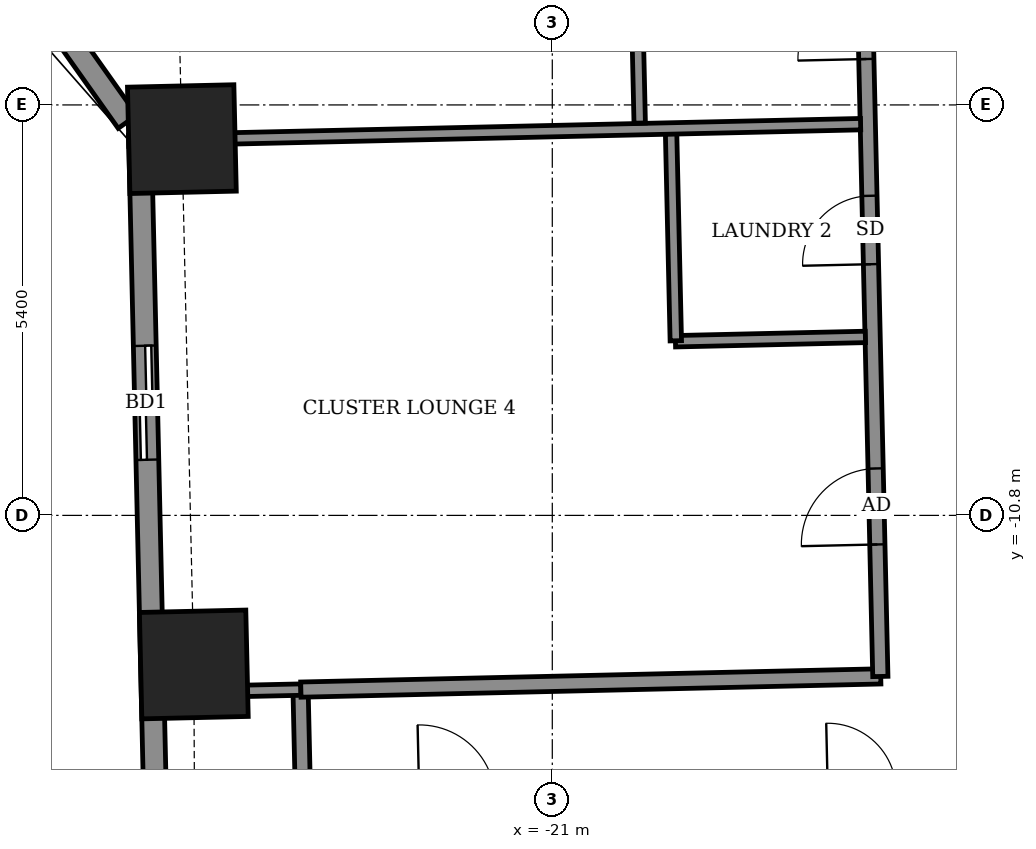
"""IFC4 building model, lengths in metres.
Left out: names, types, materials, properties, quantities, classifications, styles, units other than length and angle.
Written with IfcOpenShell. Run it as: python <this file> out.ifc"""

import sys

from ifc_helpers import new_model, si_unit, direction, frame, frame_2d, origin, origin_2d, place, context, subcontext, project, spatial, rectangle, extrude, element, fill, save


model = new_model("IFC4")
c1 = context("Model", 3, precision=1e-05, world=origin(), true_north=direction((0.0, 1.0)))
c2 = subcontext(c1, "Body", "Model", "MODEL_VIEW")
j1 = project(units=[si_unit("LENGTHUNIT", "METRE"), si_unit("PLANEANGLEUNIT", "RADIAN")], contexts=[c1])
p1 = place(None, origin())
s1 = spatial("IfcSite", under=j1, at=p1, CompositionType="ELEMENT")
p2 = place(p1, origin())
s2 = spatial("IfcBuilding", under=s1, at=p2, CompositionType="ELEMENT")
p3 = place(p2, frame((0.0, 0.0, 90.1)))
s3 = spatial("IfcBuildingStorey", under=s2, at=p3, CompositionType="ELEMENT", Elevation=90.1)
for number, where, z_axis, x_axis in (
    (1, (-25.873, -5.85, -0.55), (0.0, 0.0, 1.0), (0.023, -1.0, 0.0)),
    (2, (-25.716, -12.761, -0.55), (0.0, 0.0, 1.0), (0.023, -1.0, 0.0)),
):
    element("IfcColumn", number, at=place(p3, frame(where, z_axis=z_axis, x_axis=x_axis)), inside=s3, PredefinedType="COLUMN", context=c2, shape_type="SweptSolid", body=[
        extrude(rectangle(XDim=1.4, YDim=1.4, at=origin_2d()), origin(), (0.0, 0.0, 1.0), 3.6),
    ])
p4 = place(p3, frame((-28.651, -2.71, 0.0), z_axis=(0.0, 0.0, 1.0), x_axis=(0.577964171051, -0.816062140392, 0.0)))
e3 = element("IfcWall", 3, at=p4, inside=s3, PredefinedType="SOLIDWALL", context=c2, shape_type="SweptSolid", body=[
    extrude(rectangle(XDim=3.567, YDim=0.3, at=frame_2d((1.784, 0.0))), origin(), (0.0, 0.0, 1.0), 3.05),
])
p5 = place(p4, frame((0.337, 0.0, 0.9)))
e4 = element("IfcOpeningElement", 4, at=p5, cuts=e3, PredefinedType="OPENING", context=c2, shape_type="SweptSolid", body=[
    extrude(rectangle(XDim=1.2, YDim=1.5, at=frame_2d((0.6, 0.75))), frame((0.0, 0.16, 0.0), z_axis=(0.0, -1.0, 0.0), x_axis=(1.0, 0.0, 0.0)), (0.0, 0.0, 1.0), 0.32),
])
p6 = place(p3, frame((-26.424, -5.808, 0.0), z_axis=(0.0, 0.0, 1.0), x_axis=(0.022654755793, -0.999743348085, 0.0)))
e5 = element("IfcWall", 5, at=p6, inside=s3, PredefinedType="SOLIDWALL", context=c2, shape_type="SweptSolid", body=[
    extrude(rectangle(XDim=13.729, YDim=0.3, at=frame_2d((6.865, 0.0))), origin(), (0.0, 0.0, 1.0), 3.05),
])
p7 = place(p6, frame((2.761, 0.0, 0.0)))
e6 = element("IfcOpeningElement", 6, at=p7, cuts=e5, PredefinedType="OPENING", context=c2, shape_type="SweptSolid", body=[
    extrude(rectangle(XDim=1.5, YDim=2.4, at=frame_2d((0.75, 1.2))), frame((0.0, 0.16, 0.0), z_axis=(0.0, -1.0, 0.0), x_axis=(1.0, 0.0, 0.0)), (0.0, 0.0, 1.0), 0.32),
])
p8 = place(p6, frame((8.894, 0.0, 0.9)))
e7 = element("IfcOpeningElement", 7, at=p8, cuts=e5, PredefinedType="OPENING", context=c2, shape_type="SweptSolid", body=[
    extrude(rectangle(XDim=2.4, YDim=1.5, at=frame_2d((1.2, 0.75))), frame((0.0, 0.16, 0.0), z_axis=(0.0, -1.0, 0.0), x_axis=(1.0, 0.0, 0.0)), (0.0, 0.0, 1.0), 0.32),
])
p9 = place(p3, frame((-24.278, -14.591, 0.0), z_axis=(0.0, 0.0, 1.0), x_axis=(-0.022632637625, 0.99974384905, 0.0)))
e8 = element("IfcWall", 8, at=p9, inside=s3, PredefinedType="PARTITIONING", context=c2, shape_type="SweptSolid", body=[
    extrude(rectangle(XDim=1.5, YDim=0.2, at=frame_2d((0.75, 0.0))), origin(), (0.0, 0.0, 1.0), 3.05),
])
p10 = place(p3, frame((-24.274, -14.591, 0.0), z_axis=(0.0, 0.0, 1.0), x_axis=(0.999742718753, 0.022682510909, 0.0)))
e9 = element("IfcWall", 9, at=p10, inside=s3, PredefinedType="PARTITIONING", context=c2, shape_type="SweptSolid", body=[
    extrude(rectangle(XDim=52.471, YDim=0.2, at=frame_2d((26.236, 0.0))), origin(), (0.0, 0.0, 1.0), 3.05),
])
p11 = place(p10, frame((1.525, 0.0, 0.0)))
e10 = element("IfcOpeningElement", 10, at=p11, cuts=e9, PredefinedType="OPENING", context=c2, shape_type="SweptSolid", body=[
    extrude(rectangle(XDim=1.0, YDim=2.1, at=frame_2d((0.5, 1.05))), frame((0.0, 0.11, 0.0), z_axis=(0.0, -1.0, 0.0), x_axis=(1.0, 0.0, 0.0)), (0.0, 0.0, 1.0), 0.22),
])
p12 = place(p10, frame((6.9, 0.0, 0.0)))
e11 = element("IfcOpeningElement", 11, at=p12, cuts=e9, PredefinedType="OPENING", context=c2, shape_type="SweptSolid", body=[
    extrude(rectangle(XDim=0.9, YDim=2.1, at=frame_2d((0.45, 1.05))), frame((0.0, 0.11, 0.0), z_axis=(0.0, -1.0, 0.0), x_axis=(1.0, 0.0, 0.0)), (0.0, 0.0, 1.0), 0.22),
])
p13 = place(p10, frame((11.575, 0.0, 0.0)))
e12 = element("IfcOpeningElement", 12, at=p13, cuts=e9, PredefinedType="OPENING", context=c2, shape_type="SweptSolid", body=[
    extrude(rectangle(XDim=0.9, YDim=2.1, at=frame_2d((0.45, 1.05))), frame((0.0, 0.11, 0.0), z_axis=(0.0, -1.0, 0.0), x_axis=(1.0, 0.0, 0.0)), (0.0, 0.0, 1.0), 0.22),
])
p14 = place(p10, frame((13.6, 0.0, 0.0)))
e13 = element("IfcOpeningElement", 13, at=p14, cuts=e9, PredefinedType="OPENING", context=c2, shape_type="SweptSolid", body=[
    extrude(rectangle(XDim=0.9, YDim=2.1, at=frame_2d((0.45, 1.05))), frame((0.0, 0.11, 0.0), z_axis=(0.0, -1.0, 0.0), x_axis=(1.0, 0.0, 0.0)), (0.0, 0.0, 1.0), 0.22),
])
p15 = place(p10, frame((20.45, 0.0, 0.0)))
e14 = element("IfcOpeningElement", 14, at=p15, cuts=e9, PredefinedType="OPENING", context=c2, shape_type="SweptSolid", body=[
    extrude(rectangle(XDim=0.9, YDim=2.1, at=frame_2d((0.45, 1.05))), frame((0.0, 0.11, 0.0), z_axis=(0.0, -1.0, 0.0), x_axis=(1.0, 0.0, 0.0)), (0.0, 0.0, 1.0), 0.22),
])
p16 = place(p10, frame((22.6, 0.0, 0.0)))
e15 = element("IfcOpeningElement", 15, at=p16, cuts=e9, PredefinedType="OPENING", context=c2, shape_type="SweptSolid", body=[
    extrude(rectangle(XDim=0.9, YDim=2.1, at=frame_2d((0.45, 1.05))), frame((0.0, 0.11, 0.0), z_axis=(0.0, -1.0, 0.0), x_axis=(1.0, 0.0, 0.0)), (0.0, 0.0, 1.0), 0.22),
])
p17 = place(p10, frame((29.475, 0.0, 0.0)))
e16 = element("IfcOpeningElement", 16, at=p17, cuts=e9, PredefinedType="OPENING", context=c2, shape_type="SweptSolid", body=[
    extrude(rectangle(XDim=0.9, YDim=2.1, at=frame_2d((0.45, 1.05))), frame((0.0, 0.11, 0.0), z_axis=(0.0, -1.0, 0.0), x_axis=(1.0, 0.0, 0.0)), (0.0, 0.0, 1.0), 0.22),
])
p18 = place(p10, frame((31.675, 0.0, 0.0)))
e17 = element("IfcOpeningElement", 17, at=p18, cuts=e9, PredefinedType="OPENING", context=c2, shape_type="SweptSolid", body=[
    extrude(rectangle(XDim=0.9, YDim=2.1, at=frame_2d((0.45, 1.05))), frame((0.0, 0.11, 0.0), z_axis=(0.0, -1.0, 0.0), x_axis=(1.0, 0.0, 0.0)), (0.0, 0.0, 1.0), 0.22),
])
p19 = place(p10, frame((38.675, 0.0, 0.0)))
e18 = element("IfcOpeningElement", 18, at=p19, cuts=e9, PredefinedType="OPENING", context=c2, shape_type="SweptSolid", body=[
    extrude(rectangle(XDim=0.9, YDim=2.1, at=frame_2d((0.45, 1.05))), frame((0.0, 0.11, 0.0), z_axis=(0.0, -1.0, 0.0), x_axis=(1.0, 0.0, 0.0)), (0.0, 0.0, 1.0), 0.22),
])
p20 = place(p10, frame((40.675, 0.0, 0.0)))
e19 = element("IfcOpeningElement", 19, at=p20, cuts=e9, PredefinedType="OPENING", context=c2, shape_type="SweptSolid", body=[
    extrude(rectangle(XDim=0.9, YDim=2.1, at=frame_2d((0.45, 1.05))), frame((0.0, 0.11, 0.0), z_axis=(0.0, -1.0, 0.0), x_axis=(1.0, 0.0, 0.0)), (0.0, 0.0, 1.0), 0.22),
])
p21 = place(p10, frame((50.436, 0.0, 0.0)))
e20 = element("IfcOpeningElement", 20, at=p21, cuts=e9, PredefinedType="OPENING", context=c2, shape_type="SweptSolid", body=[
    extrude(rectangle(XDim=1.0, YDim=2.1, at=frame_2d((0.5, 1.05))), frame((0.0, 0.11, 0.0), z_axis=(0.0, -1.0, 0.0), x_axis=(1.0, 0.0, 0.0)), (0.0, 0.0, 1.0), 0.22),
])
p22 = place(p10, frame((45.45, 0.0, 0.0)))
e21 = element("IfcOpeningElement", 21, at=p22, cuts=e9, PredefinedType="OPENING", context=c2, shape_type="SweptSolid", body=[
    extrude(rectangle(XDim=0.9, YDim=2.1, at=frame_2d((0.45, 1.05))), frame((0.0, 0.11, 0.0), z_axis=(0.0, -1.0, 0.0), x_axis=(1.0, 0.0, 0.0)), (0.0, 0.0, 1.0), 0.22),
])
p23 = place(p3, frame((-26.108, -13.132, 0.0), z_axis=(0.0, 0.0, 1.0), x_axis=(0.999752642043, 0.022240834685, 0.0)))
e22 = element("IfcWall", 22, at=p23, inside=s3, PredefinedType="PARTITIONING", context=c2, shape_type="SweptSolid", body=[
    extrude(rectangle(XDim=1.8, YDim=0.15, at=frame_2d((0.9, 0.0))), origin(), (0.0, 0.0, 1.0), 3.05),
])
p24 = place(p3, frame((-24.308, -13.092, 0.0), z_axis=(0.0, 0.0, 1.0), x_axis=(0.999739800004, 0.022810793222, 0.0)))
e23 = element("IfcWall", 23, at=p24, inside=s3, PredefinedType="PARTITIONING", context=c2, shape_type="SweptSolid", body=[
    extrude(rectangle(XDim=7.631, YDim=0.2, at=frame_2d((3.815, 0.0))), origin(), (0.0, 0.0, 1.0), 3.05),
])
p25 = place(p3, frame((-16.684, -12.919, 0.0), z_axis=(0.0, 0.0, 1.0), x_axis=(-0.022706151961, 0.999742182097, 0.0)))
e24 = element("IfcWall", 24, at=p25, inside=s3, PredefinedType="PARTITIONING", context=c2, shape_type="SweptSolid", body=[
    extrude(rectangle(XDim=25.45, YDim=0.2, at=frame_2d((12.725, 0.0))), origin(), (0.0, 0.0, 1.0), 3.05),
])
p26 = place(p25, frame((23.938, 0.0, 0.0)))
e25 = element("IfcOpeningElement", 25, at=p26, cuts=e24, PredefinedType="OPENING", context=c2, shape_type="SweptSolid", body=[
    extrude(rectangle(XDim=1.0, YDim=2.1, at=frame_2d((0.5, 1.05))), frame((0.0, 0.11, 0.0), z_axis=(0.0, -1.0, 0.0), x_axis=(1.0, 0.0, 0.0)), (0.0, 0.0, 1.0), 0.22),
])
p27 = place(p25, frame((21.775, 0.0, 0.0)))
e26 = element("IfcOpeningElement", 26, at=p27, cuts=e24, PredefinedType="OPENING", context=c2, shape_type="SweptSolid", body=[
    extrude(rectangle(XDim=0.9, YDim=2.1, at=frame_2d((0.45, 1.05))), frame((0.0, 0.11, 0.0), z_axis=(0.0, -1.0, 0.0), x_axis=(1.0, 0.0, 0.0)), (0.0, 0.0, 1.0), 0.22),
])
p28 = place(p25, frame((16.975, 0.0, 0.0)))
e27 = element("IfcOpeningElement", 27, at=p28, cuts=e24, PredefinedType="OPENING", context=c2, shape_type="SweptSolid", body=[
    extrude(rectangle(XDim=1.0, YDim=2.1, at=frame_2d((0.5, 1.05))), frame((0.0, 0.11, 0.0), z_axis=(0.0, -1.0, 0.0), x_axis=(1.0, 0.0, 0.0)), (0.0, 0.0, 1.0), 0.22),
])
p29 = place(p25, frame((19.275, 0.0, 0.0)))
e28 = element("IfcOpeningElement", 28, at=p29, cuts=e24, PredefinedType="OPENING", context=c2, shape_type="SweptSolid", body=[
    extrude(rectangle(XDim=0.9, YDim=2.1, at=frame_2d((0.45, 1.05))), frame((0.0, 0.11, 0.0), z_axis=(0.0, -1.0, 0.0), x_axis=(1.0, 0.0, 0.0)), (0.0, 0.0, 1.0), 0.22),
])
p30 = place(p25, frame((15.075, 0.0, 0.0)))
e29 = element("IfcOpeningElement", 29, at=p30, cuts=e24, PredefinedType="OPENING", context=c2, shape_type="SweptSolid", body=[
    extrude(rectangle(XDim=1.0, YDim=2.1, at=frame_2d((0.5, 1.05))), frame((0.0, 0.11, 0.0), z_axis=(0.0, -1.0, 0.0), x_axis=(1.0, 0.0, 0.0)), (0.0, 0.0, 1.0), 0.22),
])
p31 = place(p25, frame((12.975, 0.0, 0.0)))
e30 = element("IfcOpeningElement", 30, at=p31, cuts=e24, PredefinedType="OPENING", context=c2, shape_type="SweptSolid", body=[
    extrude(rectangle(XDim=0.9, YDim=2.1, at=frame_2d((0.45, 1.05))), frame((0.0, 0.11, 0.0), z_axis=(0.0, -1.0, 0.0), x_axis=(1.0, 0.0, 0.0)), (0.0, 0.0, 1.0), 0.22),
])
p32 = place(p25, frame((10.55, 0.0, 0.0)))
e31 = element("IfcOpeningElement", 31, at=p32, cuts=e24, PredefinedType="OPENING", context=c2, shape_type="SweptSolid", body=[
    extrude(rectangle(XDim=1.0, YDim=2.1, at=frame_2d((0.5, 1.05))), frame((0.0, 0.11, 0.0), z_axis=(0.0, -1.0, 0.0), x_axis=(1.0, 0.0, 0.0)), (0.0, 0.0, 1.0), 0.22),
])
p33 = place(p25, frame((8.125, 0.0, 0.0)))
e32 = element("IfcOpeningElement", 32, at=p33, cuts=e24, PredefinedType="OPENING", context=c2, shape_type="SweptSolid", body=[
    extrude(rectangle(XDim=0.9, YDim=2.1, at=frame_2d((0.45, 1.05))), frame((0.0, 0.11, 0.0), z_axis=(0.0, -1.0, 0.0), x_axis=(1.0, 0.0, 0.0)), (0.0, 0.0, 1.0), 0.22),
])
p34 = place(p25, frame((1.737, 0.0, 0.0)))
e33 = element("IfcOpeningElement", 33, at=p34, cuts=e24, PredefinedType="OPENING", context=c2, shape_type="SweptSolid", body=[
    extrude(rectangle(XDim=1.0, YDim=2.1, at=frame_2d((0.5, 1.05))), frame((0.0, 0.11, 0.0), z_axis=(0.0, -1.0, 0.0), x_axis=(1.0, 0.0, 0.0)), (0.0, 0.0, 1.0), 0.22),
])
p35 = place(p25, frame((5.425, 0.0, 0.0)))
e34 = element("IfcOpeningElement", 34, at=p35, cuts=e24, PredefinedType="OPENING", context=c2, shape_type="SweptSolid", body=[
    extrude(rectangle(XDim=0.9, YDim=2.1, at=frame_2d((0.45, 1.05))), frame((0.0, 0.11, 0.0), z_axis=(0.0, -1.0, 0.0), x_axis=(1.0, 0.0, 0.0)), (0.0, 0.0, 1.0), 0.22),
])
p36 = place(p3, frame((-19.38, -8.509, 0.0), z_axis=(0.0, 0.0, 1.0), x_axis=(0.999738750294, 0.02285675306, 0.0)))
e35 = element("IfcWall", 35, at=p36, inside=s3, PredefinedType="PARTITIONING", context=c2, shape_type="SweptSolid", body=[
    extrude(rectangle(XDim=2.5, YDim=0.15, at=frame_2d((1.25, 0.0))), origin(), (0.0, 0.0, 1.0), 3.05),
])
p37 = place(p3, frame((-19.375, -8.503, 0.0), z_axis=(0.0, 0.0, 1.0), x_axis=(-0.022760079124, 0.999740955847, 0.0)))
e36 = element("IfcWall", 36, at=p37, inside=s3, PredefinedType="PARTITIONING", context=c2, shape_type="SweptSolid", body=[
    extrude(rectangle(XDim=2.725, YDim=0.15, at=frame_2d((1.362, 0.0))), origin(), (0.0, 0.0, 1.0), 3.05),
])
p38 = place(p3, frame((-26.573, -5.871, 0.0), z_axis=(0.0, 0.0, 1.0), x_axis=(0.999743768709, 0.022636186244, 0.0)))
e37 = element("IfcWall", 37, at=p38, inside=s3, PredefinedType="PARTITIONING", context=c2, shape_type="SweptSolid", body=[
    extrude(rectangle(XDim=9.631, YDim=0.15, at=frame_2d((4.816, 0.0))), origin(), (0.0, 0.0, 1.0), 3.05),
])
p39 = place(p3, frame((-19.85, -5.639, 0.0), z_axis=(0.0, 0.0, 1.0), x_axis=(-0.022523775833, 0.999746307581, 0.0)))
e38 = element("IfcWall", 38, at=p39, inside=s3, PredefinedType="PARTITIONING", context=c2, shape_type="SweptSolid", body=[
    extrude(rectangle(XDim=2.526, YDim=0.15, at=frame_2d((1.263, 0.0))), origin(), (0.0, 0.0, 1.0), 3.05),
])
p40 = place(p7, origin())
e39 = element("IfcDoor", 39, at=p40, inside=s3, OperationType="SLIDING_TO_LEFT", PredefinedType="DOOR", context=c2, shape_type="SweptSolid", body=[
    extrude(rectangle(XDim=1.5, YDim=2.4, at=frame_2d((0.75, 1.2))), frame((0.0, 0.025, 0.0), z_axis=(0.0, -1.0, 0.0), x_axis=(1.0, 0.0, 0.0)), (0.0, 0.0, 1.0), 0.05),
])
fill(e6, e39)
p41 = place(p33, origin())
e40 = element("IfcDoor", 40, at=p41, inside=s3, OperationType="SINGLE_SWING_RIGHT", PredefinedType="DOOR", context=c2, shape_type="SweptSolid", body=[
    extrude(rectangle(XDim=0.9, YDim=2.1, at=frame_2d((0.45, 1.05))), frame((0.0, 0.025, 0.0), z_axis=(0.0, -1.0, 0.0), x_axis=(1.0, 0.0, 0.0)), (0.0, 0.0, 1.0), 0.05),
])
fill(e32, e40)
p42 = place(p34, origin())
e41 = element("IfcDoor", 41, at=p42, inside=s3, OperationType="SINGLE_SWING_LEFT", PredefinedType="DOOR", context=c2, shape_type="SweptSolid", body=[
    extrude(rectangle(XDim=1.0, YDim=2.1, at=frame_2d((0.5, 1.05))), frame((0.0, 0.025, 0.0), z_axis=(0.0, -1.0, 0.0), x_axis=(1.0, 0.0, 0.0)), (0.0, 0.0, 1.0), 0.05),
])
fill(e33, e41)
p43 = place(p35, origin())
e42 = element("IfcDoor", 42, at=p43, inside=s3, OperationType="SINGLE_SWING_LEFT", PredefinedType="DOOR", context=c2, shape_type="SweptSolid", body=[
    extrude(rectangle(XDim=0.9, YDim=2.1, at=frame_2d((0.45, 1.05))), frame((0.0, 0.025, 0.0), z_axis=(0.0, -1.0, 0.0), x_axis=(1.0, 0.0, 0.0)), (0.0, 0.0, 1.0), 0.05),
])
fill(e34, e42)
save(model, sys.argv[1])
